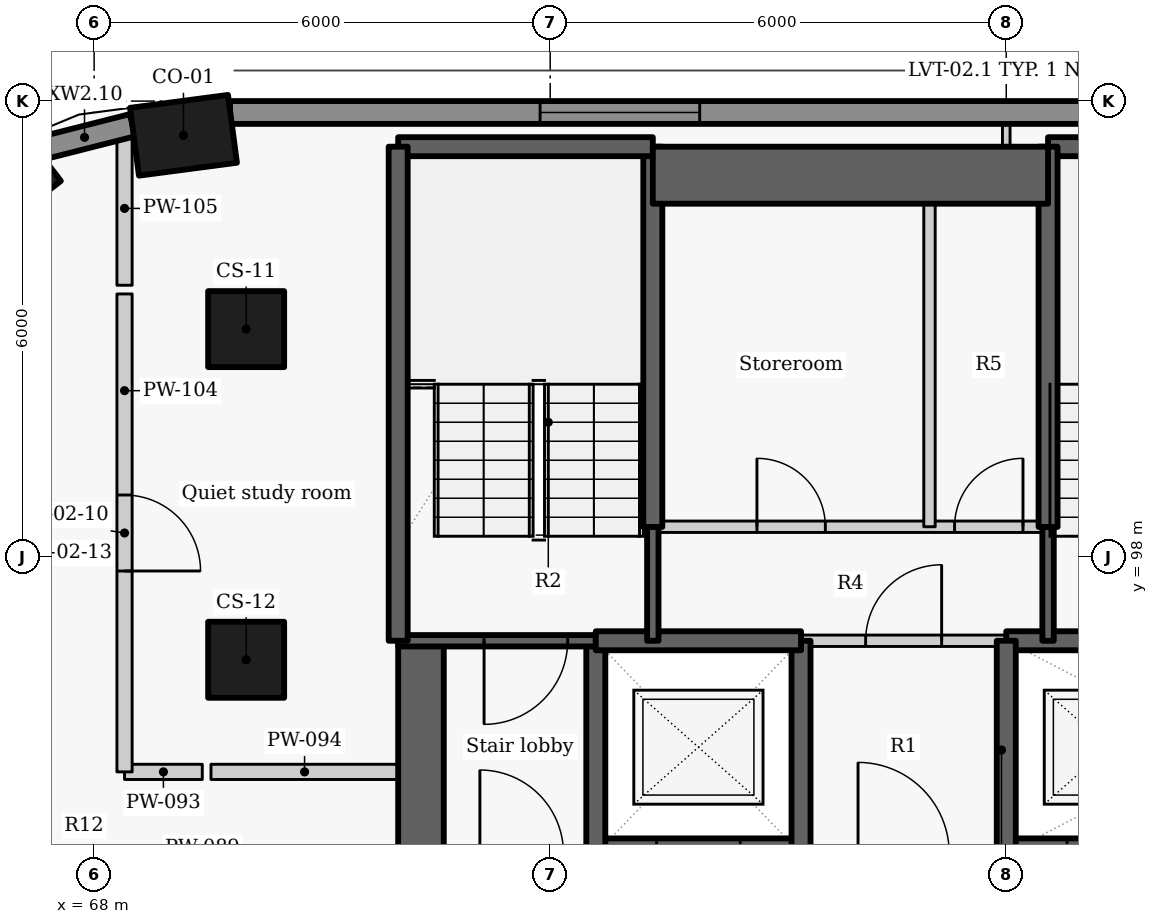
"""IFC4 building model, lengths in metres.
Left out: names, types, materials, properties, quantities, classifications, styles, units other than length and angle.
Written with IfcOpenShell. Run it as: python <this file> out.ifc"""

import sys

from ifc_helpers import new_model, si_unit, direction, frame, frame_2d, origin, origin_2d, place, context, subcontext, project, spatial, rectangle, extrude, element, fill, save


model = new_model("IFC4")
c1 = context("Model", 3, precision=1e-05, world=origin(), true_north=direction((0.0, 1.0)))
c2 = subcontext(c1, "Body", "Model", "MODEL_VIEW")
j1 = project(units=[si_unit("LENGTHUNIT", "METRE"), si_unit("PLANEANGLEUNIT", "RADIAN")], contexts=[c1])
p1 = place(None, origin())
s1 = spatial("IfcSite", under=j1, at=p1, CompositionType="ELEMENT")
p2 = place(p1, origin())
s2 = spatial("IfcBuilding", under=s1, at=p2, CompositionType="ELEMENT")
p3 = place(p2, frame((0.0, 0.0, 150.3)))
s3 = spatial("IfcBuildingStorey", under=s2, at=p3, CompositionType="ELEMENT", Elevation=150.3)
for number, where, z_axis, x_axis in (
    (1, (69.175, 103.55, 0.0), (0.0, 0.0, 1.0), (-0.991, -0.131, 0.0)),
    (2, (66.773, 102.91, 0.0), (0.0, 0.0, 1.0), (-0.793, -0.609, 0.0)),
):
    element("IfcColumn", number, at=place(p3, frame(where, z_axis=z_axis, x_axis=x_axis)), inside=s3, PredefinedType="COLUMN", context=c2, shape_type="SweptSolid", body=[
        extrude(rectangle(XDim=1.3, YDim=0.9, at=origin_2d()), origin(), (0.0, 0.0, 1.0), 3.3),
    ])
for number, where, z_axis, x_axis in (
    (3, (70.0, 101.0, 0.0), (0.0, 0.0, 1.0), (0.0, -1.0, 0.0)),
    (4, (70.0, 96.65, 0.0), (0.0, 0.0, 1.0), (0.0, -1.0, 0.0)),
):
    element("IfcColumn", number, at=place(p3, frame(where, z_axis=z_axis, x_axis=x_axis)), inside=s3, PredefinedType="COLUMN", context=c2, shape_type="SweptSolid", body=[
        extrude(rectangle(XDim=1.0, YDim=1.0, at=origin_2d()), origin(), (0.0, 0.0, 1.0), 3.3),
    ])
p4 = place(p3, frame((90.179, 103.85, 0.0), z_axis=(0.0, 0.0, 1.0), x_axis=(-1.0, 0.0, 0.0)))
e5 = element("IfcWall", 5, at=p4, inside=s3, PredefinedType="SOLIDWALL", context=c2, shape_type="SweptSolid", body=[
    extrude(rectangle(XDim=20.391, YDim=0.3, at=frame_2d((10.196, 0.0))), origin(), (0.0, 0.0, 1.0), 2.425),
])
p5 = place(p4, frame((4.051, 0.0, 0.9)))
e6 = element("IfcOpeningElement", 6, at=p5, cuts=e5, PredefinedType="OPENING", context=c2, shape_type="SweptSolid", body=[
    extrude(rectangle(XDim=2.1, YDim=1.1, at=frame_2d((1.05, 0.55))), frame((0.0, 0.16, 0.0), z_axis=(0.0, -1.0, 0.0), x_axis=(1.0, 0.0, 0.0)), (0.0, 0.0, 1.0), 0.32),
])
p6 = place(p4, frame((14.212, 0.0, 0.9)))
e7 = element("IfcOpeningElement", 7, at=p6, cuts=e5, PredefinedType="OPENING", context=c2, shape_type="SweptSolid", body=[
    extrude(rectangle(XDim=2.1, YDim=1.1, at=frame_2d((1.05, 0.55))), frame((0.0, 0.16, 0.0), z_axis=(0.0, -1.0, 0.0), x_axis=(1.0, 0.0, 0.0)), (0.0, 0.0, 1.0), 0.32),
])
p7 = place(p3, frame((68.506, 103.683, 0.0), z_axis=(0.0, 0.0, 1.0), x_axis=(-0.96924493129, -0.246098076322, 0.0)))
e8 = element("IfcWall", 8, at=p7, inside=s3, PredefinedType="SOLIDWALL", context=c2, shape_type="SweptSolid", body=[
    extrude(rectangle(XDim=1.305, YDim=0.3, at=frame_2d((0.653, 0.0))), origin(), (0.0, 0.0, 1.0), 2.425),
])
p8 = place(p3, frame((72.3, 87.8, -0.275), z_axis=(0.0, 0.0, 1.0), x_axis=(0.0, 1.0, 0.0)))
e9 = element("IfcWall", 9, at=p8, inside=s3, PredefinedType="SHEAR", context=c2, shape_type="SweptSolid", body=[
    extrude(rectangle(XDim=9.1, YDim=0.6, at=frame_2d((4.55, 0.0))), origin(), (0.0, 0.0, 1.0), 3.3),
])
p9 = place(p8, frame((3.852, 0.0, 0.275)))
e10 = element("IfcOpeningElement", 10, at=p9, cuts=e9, PredefinedType="OPENING", context=c2, shape_type="SweptSolid", body=[
    extrude(rectangle(XDim=1.5, YDim=2.1, at=frame_2d((0.75, 1.05))), frame((0.0, 0.31, 0.0), z_axis=(0.0, -1.0, 0.0), x_axis=(1.0, 0.0, 0.0)), (0.0, 0.0, 1.0), 0.62),
])
p10 = place(p3, frame((74.597, 94.1, -0.275), z_axis=(0.0, 0.0, 1.0), x_axis=(1.0, 0.0, 0.0)))
e11 = element("IfcWall", 11, at=p10, inside=s3, PredefinedType="SHEAR", context=c2, shape_type="SweptSolid", body=[
    extrude(rectangle(XDim=2.706, YDim=0.4, at=frame_2d((1.353, 0.0))), origin(), (0.0, 0.0, 1.0), 3.3),
])
p11 = place(p10, frame((0.803, 0.0, 0.275)))
e12 = element("IfcOpeningElement", 12, at=p11, cuts=e11, PredefinedType="OPENING", context=c2, shape_type="SweptSolid", body=[
    extrude(rectangle(XDim=1.1, YDim=2.1, at=frame_2d((0.55, 1.05))), frame((0.0, 0.21, 0.0), z_axis=(0.0, -1.0, 0.0), x_axis=(1.0, 0.0, 0.0)), (0.0, 0.0, 1.0), 0.42),
])
p12 = place(p3, frame((79.997, 94.1, -0.275), z_axis=(0.0, 0.0, 1.0), x_axis=(1.0, 0.0, 0.0)))
e13 = element("IfcWall", 13, at=p12, inside=s3, PredefinedType="SHEAR", context=c2, shape_type="SweptSolid", body=[
    extrude(rectangle(XDim=5.406, YDim=0.4, at=frame_2d((2.703, 0.0))), origin(), (0.0, 0.0, 1.0), 3.3),
])
p13 = place(p12, frame((0.803, 0.0, 0.275)))
e14 = element("IfcOpeningElement", 14, at=p13, cuts=e13, PredefinedType="OPENING", context=c2, shape_type="SweptSolid", body=[
    extrude(rectangle(XDim=1.1, YDim=2.1, at=frame_2d((0.55, 1.05))), frame((0.0, 0.21, 0.0), z_axis=(0.0, -1.0, 0.0), x_axis=(1.0, 0.0, 0.0)), (0.0, 0.0, 1.0), 0.42),
])
p14 = place(p3, frame((74.6, 94.1, -0.275), z_axis=(0.0, 0.0, 1.0), x_axis=(0.0, 1.0, 0.0)))
e15 = element("IfcWall", 15, at=p14, inside=s3, PredefinedType="SHEAR", context=c2, shape_type="SweptSolid", body=[
    extrude(rectangle(XDim=2.8, YDim=0.25, at=frame_2d((1.4, 0.0))), origin(), (0.0, 0.0, 1.0), 3.3),
])
p15 = place(p3, frame((74.6, 96.9, -0.275), z_axis=(0.0, 0.0, 1.0), x_axis=(-1.0, 0.0, 0.0)))
e16 = element("IfcWall", 16, at=p15, inside=s3, PredefinedType="SHEAR", context=c2, shape_type="SweptSolid", body=[
    extrude(rectangle(XDim=2.6, YDim=0.15, at=frame_2d((1.3, 0.0))), origin(), (0.0, 0.0, 1.0), 3.3),
])
p16 = place(p15, frame((0.37, 0.0, 0.275)))
e17 = element("IfcOpeningElement", 17, at=p16, cuts=e16, PredefinedType="OPENING", context=c2, shape_type="SweptSolid", body=[
    extrude(rectangle(XDim=1.1, YDim=2.1, at=frame_2d((0.55, 1.05))), frame((0.0, 0.085, 0.0), z_axis=(0.0, -1.0, 0.0), x_axis=(1.0, 0.0, 0.0)), (0.0, 0.0, 1.0), 0.17),
])
p17 = place(p3, frame((77.3, 94.1, -0.275), z_axis=(0.0, 0.0, 1.0), x_axis=(0.0, 1.0, 0.0)))
e18 = element("IfcWall", 18, at=p17, inside=s3, PredefinedType="SHEAR", context=c2, shape_type="SweptSolid", body=[
    extrude(rectangle(XDim=2.8, YDim=0.25, at=frame_2d((1.4, 0.0))), origin(), (0.0, 0.0, 1.0), 3.3),
])
p18 = place(p3, frame((74.6, 96.9, -0.275), z_axis=(0.0, 0.0, 1.0), x_axis=(1.0, 0.0, 0.0)))
e19 = element("IfcWall", 19, at=p18, inside=s3, PredefinedType="SHEAR", context=c2, shape_type="SweptSolid", body=[
    extrude(rectangle(XDim=2.7, YDim=0.25, at=frame_2d((1.35, 0.0))), origin(), (0.0, 0.0, 1.0), 3.3),
])
p19 = place(p3, frame((80.0, 96.9, -0.275), z_axis=(0.0, 0.0, 1.0), x_axis=(1.0, 0.0, 0.0)))
e20 = element("IfcWall", 20, at=p19, inside=s3, PredefinedType="SHEAR", context=c2, shape_type="SweptSolid", body=[
    extrude(rectangle(XDim=8.0, YDim=0.25, at=frame_2d((4.0, 0.0))), origin(), (0.0, 0.0, 1.0), 3.3),
])
p20 = place(p19, frame((3.849, 0.0, 0.275)))
e21 = element("IfcOpeningElement", 21, at=p20, cuts=e20, PredefinedType="OPENING", context=c2, shape_type="SweptSolid", body=[
    extrude(rectangle(XDim=1.1, YDim=2.1, at=frame_2d((0.55, 1.05))), frame((0.0, 0.135, 0.0), z_axis=(0.0, -1.0, 0.0), x_axis=(1.0, 0.0, 0.0)), (0.0, 0.0, 1.0), 0.27),
])
p21 = place(p3, frame((80.0, 94.1, -0.275), z_axis=(0.0, 0.0, 1.0), x_axis=(0.0, 1.0, 0.0)))
e22 = element("IfcWall", 22, at=p21, inside=s3, PredefinedType="SHEAR", context=c2, shape_type="SweptSolid", body=[
    extrude(rectangle(XDim=2.8, YDim=0.25, at=frame_2d((1.4, 0.0))), origin(), (0.0, 0.0, 1.0), 3.3),
])
p22 = place(p3, frame((77.3, 96.9, 0.0), z_axis=(0.0, 0.0, 1.0), x_axis=(1.0, 0.0, 0.0)))
e23 = element("IfcWall", 23, at=p22, inside=s3, PredefinedType="PARTITIONING", context=c2, shape_type="SweptSolid", body=[
    extrude(rectangle(XDim=2.7, YDim=0.15, at=frame_2d((1.35, 0.0))), origin(), (0.0, 0.0, 1.0), 3.025),
])
p23 = place(p22, frame((0.85, 0.0, 0.0)))
e24 = element("IfcOpeningElement", 24, at=p23, cuts=e23, PredefinedType="OPENING", context=c2, shape_type="SweptSolid", body=[
    extrude(rectangle(XDim=1.0, YDim=2.1, at=frame_2d((0.5, 1.05))), frame((0.0, 0.085, 0.0), z_axis=(0.0, -1.0, 0.0), x_axis=(1.0, 0.0, 0.0)), (0.0, 0.0, 1.0), 0.17),
])
p24 = place(p3, frame((75.35, 96.9, -0.275), z_axis=(0.0, 0.0, 1.0), x_axis=(0.0, 1.0, 0.0)))
e25 = element("IfcWall", 25, at=p24, inside=s3, PredefinedType="SHEAR", context=c2, shape_type="SweptSolid", body=[
    extrude(rectangle(XDim=1.503, YDim=0.15, at=frame_2d((0.751, 0.0))), origin(), (0.0, 0.0, 1.0), 3.3),
])
p25 = place(p3, frame((75.35, 98.397, -0.275), z_axis=(0.0, 0.0, 1.0), x_axis=(0.0, 1.0, 0.0)))
e26 = element("IfcWall", 26, at=p25, inside=s3, PredefinedType="SHEAR", context=c2, shape_type="SweptSolid", body=[
    extrude(rectangle(XDim=5.003, YDim=0.25, at=frame_2d((2.501, 0.0))), origin(), (0.0, 0.0, 1.0), 3.3),
])
p26 = place(p3, frame((72.0, 103.4, -0.275), z_axis=(0.0, 0.0, 1.0), x_axis=(1.0, 0.0, 0.0)))
e27 = element("IfcWall", 27, at=p26, inside=s3, PredefinedType="SHEAR", context=c2, shape_type="SweptSolid", body=[
    extrude(rectangle(XDim=3.35, YDim=0.25, at=frame_2d((1.675, 0.0))), origin(), (0.0, 0.0, 1.0), 3.3),
])
p27 = place(p3, frame((80.55, 103.4, -0.275), z_axis=(0.0, 0.0, 1.0), x_axis=(1.0, 0.0, 0.0)))
e28 = element("IfcWall", 28, at=p27, inside=s3, PredefinedType="SHEAR", context=c2, shape_type="SweptSolid", body=[
    extrude(rectangle(XDim=2.85, YDim=0.25, at=frame_2d((1.425, 0.0))), origin(), (0.0, 0.0, 1.0), 3.3),
])
p28 = place(p3, frame((72.0, 96.9, -0.275), z_axis=(0.0, 0.0, 1.0), x_axis=(0.0, 1.0, 0.0)))
e29 = element("IfcWall", 29, at=p28, inside=s3, PredefinedType="SHEAR", context=c2, shape_type="SweptSolid", body=[
    extrude(rectangle(XDim=6.5, YDim=0.25, at=frame_2d((3.25, 0.0))), origin(), (0.0, 0.0, 1.0), 3.3),
])
p29 = place(p3, frame((80.55, 96.9, -0.275), z_axis=(0.0, 0.0, 1.0), x_axis=(0.0, 1.0, 0.0)))
e30 = element("IfcWall", 30, at=p29, inside=s3, PredefinedType="SHEAR", context=c2, shape_type="SweptSolid", body=[
    extrude(rectangle(XDim=1.503, YDim=0.15, at=frame_2d((0.751, 0.0))), origin(), (0.0, 0.0, 1.0), 3.3),
])
p30 = place(p3, frame((80.55, 98.397, -0.275), z_axis=(0.0, 0.0, 1.0), x_axis=(0.0, 1.0, 0.0)))
e31 = element("IfcWall", 31, at=p30, inside=s3, PredefinedType="SHEAR", context=c2, shape_type="SweptSolid", body=[
    extrude(rectangle(XDim=5.003, YDim=0.25, at=frame_2d((2.501, 0.0))), origin(), (0.0, 0.0, 1.0), 3.3),
])
p31 = place(p3, frame((75.35, 103.025, -0.275), z_axis=(0.0, 0.0, 1.0), x_axis=(1.0, 0.0, 0.0)))
e32 = element("IfcWall", 32, at=p31, inside=s3, PredefinedType="SHEAR", context=c2, shape_type="SweptSolid", body=[
    extrude(rectangle(XDim=5.2, YDim=0.75, at=frame_2d((2.6, 0.0))), origin(), (0.0, 0.0, 1.0), 3.3),
])
p32 = place(p3, frame((75.35, 98.4, 0.0), z_axis=(0.0, 0.0, 1.0), x_axis=(1.0, 0.0, 0.0)))
e33 = element("IfcWall", 33, at=p32, inside=s3, PredefinedType="PARTITIONING", context=c2, shape_type="SweptSolid", body=[
    extrude(rectangle(XDim=5.2, YDim=0.15, at=frame_2d((2.6, 0.0))), origin(), (0.0, 0.0, 1.0), 3.025),
])
p33 = place(p32, frame((1.37, 0.0, 0.0)))
e34 = element("IfcOpeningElement", 34, at=p33, cuts=e33, PredefinedType="OPENING", context=c2, shape_type="SweptSolid", body=[
    extrude(rectangle(XDim=0.9, YDim=2.1, at=frame_2d((0.45, 1.05))), frame((0.0, 0.085, 0.0), z_axis=(0.0, -1.0, 0.0), x_axis=(1.0, 0.0, 0.0)), (0.0, 0.0, 1.0), 0.17),
])
p34 = place(p32, frame((3.97, 0.0, 0.0)))
e35 = element("IfcOpeningElement", 35, at=p34, cuts=e33, PredefinedType="OPENING", context=c2, shape_type="SweptSolid", body=[
    extrude(rectangle(XDim=0.9, YDim=2.1, at=frame_2d((0.45, 1.05))), frame((0.0, 0.085, 0.0), z_axis=(0.0, -1.0, 0.0), x_axis=(1.0, 0.0, 0.0)), (0.0, 0.0, 1.0), 0.17),
])
p35 = place(p3, frame((78.99, 98.4, 0.0), z_axis=(0.0, 0.0, 1.0), x_axis=(0.0, 1.0, 0.0)))
e36 = element("IfcWall", 36, at=p35, inside=s3, PredefinedType="PARTITIONING", context=c2, shape_type="SweptSolid", body=[
    extrude(rectangle(XDim=5.0, YDim=0.15, at=frame_2d((2.5, 0.0))), origin(), (0.0, 0.0, 1.0), 3.025),
])
p36 = place(p3, frame((68.4, 95.175, 0.0), z_axis=(0.0, 0.0, 1.0), x_axis=(1.0, 0.0, 0.0)))
e37 = element("IfcWall", 37, at=p36, inside=s3, PredefinedType="PARTITIONING", context=c2, shape_type="SweptSolid", body=[
    extrude(rectangle(XDim=1.023, YDim=0.2, at=frame_2d((0.511, 0.0))), origin(), (0.0, 0.0, 1.0), 3.025),
])
p37 = place(p3, frame((69.537, 95.175, 0.0), z_axis=(0.0, 0.0, 1.0), x_axis=(1.0, 0.0, 0.0)))
e38 = element("IfcWall", 38, at=p37, inside=s3, PredefinedType="PARTITIONING", context=c2, shape_type="SweptSolid", body=[
    extrude(rectangle(XDim=2.463, YDim=0.2, at=frame_2d((1.231, 0.0))), origin(), (0.0, 0.0, 1.0), 2.505),
])
p38 = place(p3, frame((68.4, 101.463, 0.0), z_axis=(0.0, 0.0, 1.0), x_axis=(0.0, -1.0, 0.0)))
e39 = element("IfcWall", 39, at=p38, inside=s3, PredefinedType="PARTITIONING", context=c2, shape_type="SweptSolid", body=[
    extrude(rectangle(XDim=6.288, YDim=0.2, at=frame_2d((3.144, 0.0))), origin(), (0.0, 0.0, 1.0), 3.025),
])
p39 = place(p38, frame((2.645, 0.0, 0.0)))
e40 = element("IfcOpeningElement", 40, at=p39, cuts=e39, PredefinedType="OPENING", context=c2, shape_type="SweptSolid", body=[
    extrude(rectangle(XDim=1.0, YDim=2.1, at=frame_2d((0.5, 1.05))), frame((0.0, 0.11, 0.0), z_axis=(0.0, -1.0, 0.0), x_axis=(1.0, 0.0, 0.0)), (0.0, 0.0, 1.0), 0.22),
])
p40 = place(p3, frame((68.4, 101.577, 0.0), z_axis=(0.0, 0.0, 1.0), x_axis=(0.0, 1.0, 0.0)))
e41 = element("IfcWall", 41, at=p40, inside=s3, PredefinedType="PARTITIONING", context=c2, shape_type="SweptSolid", body=[
    extrude(rectangle(XDim=2.022, YDim=0.2, at=frame_2d((1.011, 0.0))), origin(), (0.0, 0.0, 1.0), 2.405),
])
p41 = place(p3, frame((80.0, 103.4, 0.0), z_axis=(0.0, 0.0, 1.0), x_axis=(0.0, 1.0, 0.0)))
e42 = element("IfcWall", 42, at=p41, inside=s3, PredefinedType="PARTITIONING", context=c2, shape_type="SweptSolid", body=[
    extrude(rectangle(XDim=0.3, YDim=0.1, at=frame_2d((0.15, 0.0))), origin(), (0.0, 0.0, 1.0), 3.025),
])
p42 = place(p6, origin())
e43 = element("IfcWindow", 43, at=p42, inside=s3, PartitioningType="SINGLE_PANEL", PredefinedType="WINDOW", context=c2, shape_type="SweptSolid", body=[
    extrude(rectangle(XDim=2.1, YDim=1.1, at=frame_2d((1.05, 0.55))), frame((0.0, 0.03, 0.0), z_axis=(0.0, -1.0, 0.0), x_axis=(1.0, 0.0, 0.0)), (0.0, 0.0, 1.0), 0.06),
])
fill(e7, e43)
p43 = place(p23, origin())
e44 = element("IfcDoor", 44, at=p43, inside=s3, OperationType="SINGLE_SWING_RIGHT", PredefinedType="DOOR", context=c2, shape_type="SweptSolid", body=[
    extrude(rectangle(XDim=1.0, YDim=2.1, at=frame_2d((0.5, 1.05))), frame((0.0, 0.025, 0.0), z_axis=(0.0, -1.0, 0.0), x_axis=(1.0, 0.0, 0.0)), (0.0, 0.0, 1.0), 0.05),
])
fill(e24, e44)
p44 = place(p33, origin())
e45 = element("IfcDoor", 45, at=p44, inside=s3, OperationType="SINGLE_SWING_LEFT", PredefinedType="DOOR", context=c2, shape_type="SweptSolid", body=[
    extrude(rectangle(XDim=0.9, YDim=2.1, at=frame_2d((0.45, 1.05))), frame((0.0, 0.025, 0.0), z_axis=(0.0, -1.0, 0.0), x_axis=(1.0, 0.0, 0.0)), (0.0, 0.0, 1.0), 0.05),
])
fill(e34, e45)
p45 = place(p34, origin())
e46 = element("IfcDoor", 46, at=p45, inside=s3, OperationType="SINGLE_SWING_RIGHT", PredefinedType="DOOR", context=c2, shape_type="SweptSolid", body=[
    extrude(rectangle(XDim=0.9, YDim=2.1, at=frame_2d((0.45, 1.05))), frame((0.0, 0.025, 0.0), z_axis=(0.0, -1.0, 0.0), x_axis=(1.0, 0.0, 0.0)), (0.0, 0.0, 1.0), 0.05),
])
fill(e35, e46)
p46 = place(p16, origin())
e47 = element("IfcDoor", 47, at=p46, inside=s3, OperationType="SINGLE_SWING_RIGHT", PredefinedType="DOOR", context=c2, shape_type="SweptSolid", body=[
    extrude(rectangle(XDim=1.1, YDim=2.1, at=frame_2d((0.55, 1.05))), frame((0.0, 0.025, 0.0), z_axis=(0.0, -1.0, 0.0), x_axis=(1.0, 0.0, 0.0)), (0.0, 0.0, 1.0), 0.05),
])
fill(e17, e47)
p47 = place(p39, origin())
e48 = element("IfcDoor", 48, at=p47, inside=s3, OperationType="SINGLE_SWING_RIGHT", PredefinedType="DOOR", context=c2, shape_type="SweptSolid", body=[
    extrude(rectangle(XDim=1.0, YDim=2.1, at=frame_2d((0.5, 1.05))), frame((0.0, 0.025, 0.0), z_axis=(0.0, -1.0, 0.0), x_axis=(1.0, 0.0, 0.0)), (0.0, 0.0, 1.0), 0.05),
])
fill(e40, e48)
save(model, sys.argv[1])
